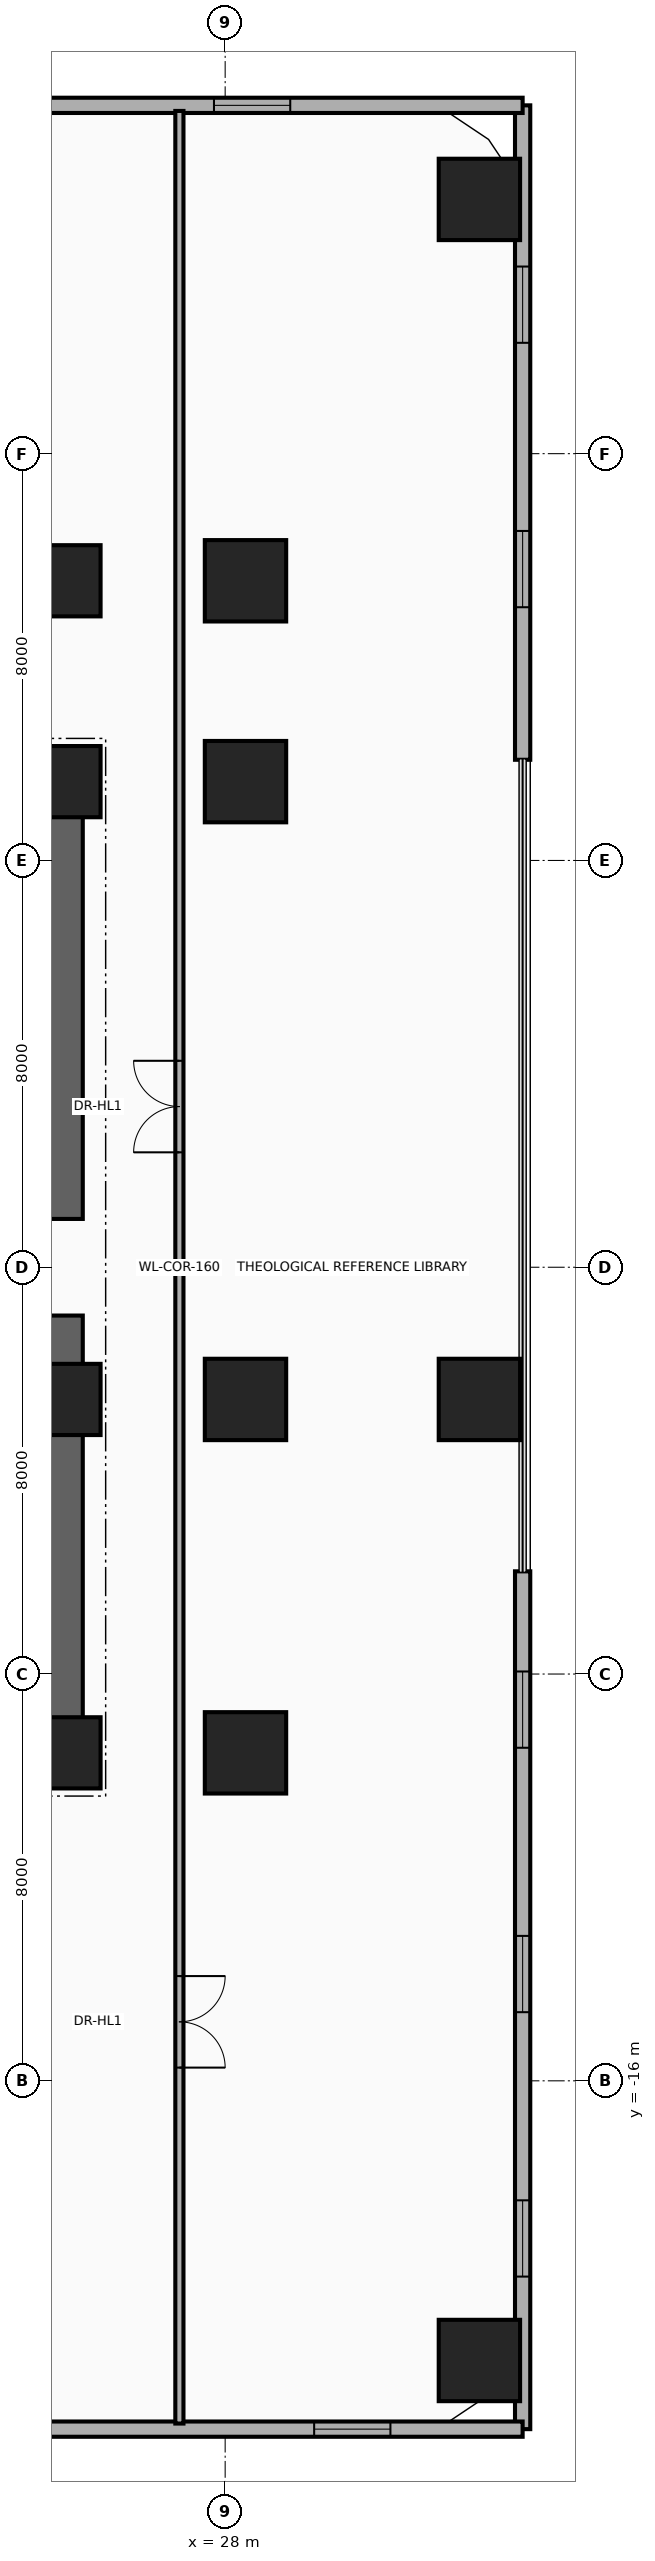
"""IFC4 building model, lengths in metres.
Left out: names, types, materials, properties, quantities, classifications, styles, units other than length and angle.
Written with IfcOpenShell. Run it as: python <this file> out.ifc"""

import sys

from ifc_helpers import new_model, si_unit, direction, frame, frame_2d, origin, origin_2d, place, context, subcontext, project, spatial, rectangle, extrude, source, transform, mapped, element, fill, save


model = new_model("IFC4")
c1 = context("Model", 3, precision=1e-05, world=origin(), true_north=direction((0.0, 1.0)))
c2 = subcontext(c1, "Body", "Model", "MODEL_VIEW")
j1 = project(units=[si_unit("LENGTHUNIT", "METRE"), si_unit("PLANEANGLEUNIT", "RADIAN")], contexts=[c1])
p1 = place(None, origin())
s1 = spatial("IfcSite", under=j1, at=p1, CompositionType="ELEMENT")
p2 = place(p1, origin())
s2 = spatial("IfcBuilding", under=s1, at=p2, CompositionType="ELEMENT")
p3 = place(p2, frame((0.0, 0.0, 15.6)))
s3 = spatial("IfcBuildingStorey", under=s2, at=p3, CompositionType="ELEMENT", Elevation=15.6)
for number, where, z_axis, x_axis in (
    (1, (24.85, -9.9, 0.0), (0.0, 0.0, 1.0), (0.0, 1.0, 0.0)),
    (2, (24.85, 0.95, 0.0), (0.0, 0.0, 1.0), (0.0, 1.0, 0.0)),
):
    element("IfcWall", number, at=place(p3, frame(where, z_axis=z_axis, x_axis=x_axis)), inside=s3, PredefinedType="SHEAR", context=c2, shape_type="SweptSolid", body=[
        extrude(rectangle(XDim=8.95, YDim=0.7, at=frame_2d((4.475, 0.0))), origin(), (0.0, 0.0, 1.0), 4.8),
    ])
for number, where, z_axis, x_axis in (
    (3, (15.85, 9.55, 0.0), (0.0, 0.0, 1.0), (1.0, 0.0, 0.0)),
    (4, (15.85, -9.55, 0.0), (0.0, 0.0, 1.0), (1.0, 0.0, 0.0)),
):
    element("IfcWall", number, at=place(p3, frame(where, z_axis=z_axis, x_axis=x_axis)), inside=s3, PredefinedType="SHEAR", context=c2, shape_type="SweptSolid", body=[
        extrude(rectangle(XDim=9.0, YDim=0.7, at=frame_2d((4.5, 0.0))), origin(), (0.0, 0.0, 1.0), 4.8),
    ])
m1 = source(origin(), c2, "Body", "SweptSolid", [
    extrude(rectangle(XDim=1.4, YDim=1.4, at=origin_2d()), origin(), (0.0, 0.0, 1.0), 5.2),
])
p4 = place(p3, frame((24.85, -9.55, 0.0), z_axis=(0.0, 0.0, 1.0), x_axis=(1.0, 0.0, 0.0)))
e5 = element("IfcColumn", 5, at=p4, inside=s3, PredefinedType="COLUMN", context=c2, shape_type="MappedRepresentation", body=[
    mapped(m1, transform((0.0, 0.0, 0.0), x_axis=(1.0, 0.0, 0.0), y_axis=(0.0, 1.0, 0.0), z_axis=(0.0, 0.0, 1.0), scale=1.0)),
])
m2 = source(origin(), c2, "Body", "SweptSolid", [
    extrude(rectangle(XDim=1.6, YDim=1.6, at=origin_2d()), origin(), (0.0, 0.0, 1.0), 5.2),
])
p5 = place(p3, frame((28.4, -9.55, 0.0), z_axis=(0.0, 0.0, 1.0), x_axis=(1.0, 0.0, 0.0)))
e6 = element("IfcColumn", 6, at=p5, inside=s3, PredefinedType="COLUMN", context=c2, shape_type="MappedRepresentation", body=[
    mapped(m2, transform((0.0, 0.0, 0.0), x_axis=(1.0, 0.0, 0.0), y_axis=(0.0, 1.0, 0.0), z_axis=(0.0, 0.0, 1.0), scale=1.0)),
])
p6 = place(p3, frame((24.85, -2.6, 0.0), z_axis=(0.0, 0.0, 1.0), x_axis=(1.0, 0.0, 0.0)))
e7 = element("IfcColumn", 7, at=p6, inside=s3, PredefinedType="COLUMN", context=c2, shape_type="MappedRepresentation", body=[
    mapped(m1, transform((0.0, 0.0, 0.0), x_axis=(1.0, 0.0, 0.0), y_axis=(0.0, 1.0, 0.0), z_axis=(0.0, 0.0, 1.0), scale=1.0)),
])
p7 = place(p3, frame((28.4, -2.6, 0.0), z_axis=(0.0, 0.0, 1.0), x_axis=(1.0, 0.0, 0.0)))
e8 = element("IfcColumn", 8, at=p7, inside=s3, PredefinedType="COLUMN", context=c2, shape_type="MappedRepresentation", body=[
    mapped(m2, transform((0.0, 0.0, 0.0), x_axis=(1.0, 0.0, 0.0), y_axis=(0.0, 1.0, 0.0), z_axis=(0.0, 0.0, 1.0), scale=1.0)),
])
p8 = place(p3, frame((24.85, 9.55, 0.0), z_axis=(0.0, 0.0, 1.0), x_axis=(1.0, 0.0, 0.0)))
e9 = element("IfcColumn", 9, at=p8, inside=s3, PredefinedType="COLUMN", context=c2, shape_type="MappedRepresentation", body=[
    mapped(m1, transform((0.0, 0.0, 0.0), x_axis=(1.0, 0.0, 0.0), y_axis=(0.0, 1.0, 0.0), z_axis=(0.0, 0.0, 1.0), scale=1.0)),
])
p9 = place(p3, frame((28.4, 9.55, 0.0), z_axis=(0.0, 0.0, 1.0), x_axis=(1.0, 0.0, 0.0)))
e10 = element("IfcColumn", 10, at=p9, inside=s3, PredefinedType="COLUMN", context=c2, shape_type="MappedRepresentation", body=[
    mapped(m2, transform((0.0, 0.0, 0.0), x_axis=(1.0, 0.0, 0.0), y_axis=(0.0, 1.0, 0.0), z_axis=(0.0, 0.0, 1.0), scale=1.0)),
])
p10 = place(p3, frame((24.85, 13.5, 0.0), z_axis=(0.0, 0.0, 1.0), x_axis=(1.0, 0.0, 0.0)))
e11 = element("IfcColumn", 11, at=p10, inside=s3, PredefinedType="COLUMN", context=c2, shape_type="MappedRepresentation", body=[
    mapped(m1, transform((0.0, 0.0, 0.0), x_axis=(1.0, 0.0, 0.0), y_axis=(0.0, 1.0, 0.0), z_axis=(0.0, 0.0, 1.0), scale=1.0)),
])
for number, where, z_axis, x_axis in (
    (12, (28.4, 13.5, 0.0), (0.0, 0.0, 1.0), (1.0, 0.0, 0.0)),
    (13, (33.0, 21.0, 0.0), (0.0, 0.0, 1.0), (1.0, 0.0, 0.0)),
    (14, (33.0, -2.6, 0.0), (0.0, 0.0, 1.0), (1.0, 0.0, 0.0)),
    (15, (33.0, -21.5, 0.0), (0.0, 0.0, 1.0), (1.0, 0.0, 0.0)),
):
    element("IfcColumn", number, at=place(p3, frame(where, z_axis=z_axis, x_axis=x_axis)), inside=s3, PredefinedType="COLUMN", context=c2, shape_type="MappedRepresentation", body=[
        mapped(m2, transform((0.0, 0.0, 0.0), x_axis=(1.0, 0.0, 0.0), y_axis=(0.0, 1.0, 0.0), z_axis=(0.0, 0.0, 1.0), scale=1.0)),
    ])
p11 = place(p3, frame((33.85, -22.85, 0.0), z_axis=(0.0, 0.0, 1.0), x_axis=(0.0, 1.0, 0.0)))
e16 = element("IfcWall", 16, at=p11, inside=s3, PredefinedType="SOLIDWALL", context=c2, shape_type="SweptSolid", body=[
    extrude(rectangle(XDim=16.87, YDim=0.3, at=frame_2d((8.435, 0.0))), origin(), (0.0, 0.0, 1.0), 4.8),
])
p12 = place(p11, frame((3.0, 0.0, 0.9)))
e17 = element("IfcOpeningElement", 17, at=p12, cuts=e16, PredefinedType="OPENING", context=c2, shape_type="SweptSolid", body=[
    extrude(rectangle(XDim=1.5, YDim=1.75, at=frame_2d((0.75, 0.875))), frame((0.0, 0.165, 0.0), z_axis=(0.0, -1.0, 0.0), x_axis=(1.0, 0.0, 0.0)), (0.0, 0.0, 1.0), 0.33),
])
p13 = place(p11, frame((8.2, 0.0, 0.9)))
e18 = element("IfcOpeningElement", 18, at=p13, cuts=e16, PredefinedType="OPENING", context=c2, shape_type="SweptSolid", body=[
    extrude(rectangle(XDim=1.5, YDim=1.75, at=frame_2d((0.75, 0.875))), frame((0.0, 0.165, 0.0), z_axis=(0.0, -1.0, 0.0), x_axis=(1.0, 0.0, 0.0)), (0.0, 0.0, 1.0), 0.33),
])
p14 = place(p11, frame((13.4, 0.0, 0.9)))
e19 = element("IfcOpeningElement", 19, at=p14, cuts=e16, PredefinedType="OPENING", context=c2, shape_type="SweptSolid", body=[
    extrude(rectangle(XDim=1.5, YDim=1.75, at=frame_2d((0.75, 0.875))), frame((0.0, 0.165, 0.0), z_axis=(0.0, -1.0, 0.0), x_axis=(1.0, 0.0, 0.0)), (0.0, 0.0, 1.0), 0.33),
])
p15 = place(p3, frame((33.85, 9.98, 0.0), z_axis=(0.0, 0.0, 1.0), x_axis=(0.0, 1.0, 0.0)))
e20 = element("IfcWall", 20, at=p15, inside=s3, PredefinedType="SOLIDWALL", context=c2, shape_type="SweptSolid", body=[
    extrude(rectangle(XDim=12.87, YDim=0.3, at=frame_2d((6.435, 0.0))), origin(), (0.0, 0.0, 1.0), 4.8),
])
p16 = place(p15, frame((3.0, 0.0, 0.9)))
e21 = element("IfcOpeningElement", 21, at=p16, cuts=e20, PredefinedType="OPENING", context=c2, shape_type="SweptSolid", body=[
    extrude(rectangle(XDim=1.5, YDim=1.75, at=frame_2d((0.75, 0.875))), frame((0.0, 0.165, 0.0), z_axis=(0.0, -1.0, 0.0), x_axis=(1.0, 0.0, 0.0)), (0.0, 0.0, 1.0), 0.33),
])
p17 = place(p15, frame((8.2, 0.0, 0.9)))
e22 = element("IfcOpeningElement", 22, at=p17, cuts=e20, PredefinedType="OPENING", context=c2, shape_type="SweptSolid", body=[
    extrude(rectangle(XDim=1.5, YDim=1.75, at=frame_2d((0.75, 0.875))), frame((0.0, 0.165, 0.0), z_axis=(0.0, -1.0, 0.0), x_axis=(1.0, 0.0, 0.0)), (0.0, 0.0, 1.0), 0.33),
])
p18 = place(p3, frame((12.15, -22.85, 0.0), z_axis=(0.0, 0.0, 1.0), x_axis=(1.0, 0.0, 0.0)))
e23 = element("IfcWall", 23, at=p18, inside=s3, PredefinedType="SOLIDWALL", context=c2, shape_type="SweptSolid", body=[
    extrude(rectangle(XDim=21.7, YDim=0.3, at=frame_2d((10.85, 0.0))), origin(), (0.0, 0.0, 1.0), 4.8),
])
p19 = place(p18, frame((3.2, 0.0, 0.9)))
e24 = element("IfcOpeningElement", 24, at=p19, cuts=e23, PredefinedType="OPENING", context=c2, shape_type="SweptSolid", body=[
    extrude(rectangle(XDim=1.5, YDim=1.75, at=frame_2d((0.75, 0.875))), frame((0.0, 0.165, 0.0), z_axis=(0.0, -1.0, 0.0), x_axis=(1.0, 0.0, 0.0)), (0.0, 0.0, 1.0), 0.33),
])
p20 = place(p18, frame((9.8, 0.0, 0.9)))
e25 = element("IfcOpeningElement", 25, at=p20, cuts=e23, PredefinedType="OPENING", context=c2, shape_type="SweptSolid", body=[
    extrude(rectangle(XDim=1.5, YDim=1.75, at=frame_2d((0.75, 0.875))), frame((0.0, 0.165, 0.0), z_axis=(0.0, -1.0, 0.0), x_axis=(1.0, 0.0, 0.0)), (0.0, 0.0, 1.0), 0.33),
])
p21 = place(p18, frame((17.6, 0.0, 0.9)))
e26 = element("IfcOpeningElement", 26, at=p21, cuts=e23, PredefinedType="OPENING", context=c2, shape_type="SweptSolid", body=[
    extrude(rectangle(XDim=1.5, YDim=1.75, at=frame_2d((0.75, 0.875))), frame((0.0, 0.165, 0.0), z_axis=(0.0, -1.0, 0.0), x_axis=(1.0, 0.0, 0.0)), (0.0, 0.0, 1.0), 0.33),
])
p22 = place(p3, frame((9.98, 22.85, 0.0), z_axis=(0.0, 0.0, 1.0), x_axis=(1.0, 0.0, 0.0)))
e27 = element("IfcWall", 27, at=p22, inside=s3, PredefinedType="SOLIDWALL", context=c2, shape_type="SweptSolid", body=[
    extrude(rectangle(XDim=23.87, YDim=0.3, at=frame_2d((11.935, 0.0))), origin(), (0.0, 0.0, 1.0), 4.8),
])
p23 = place(p22, frame((3.2, 0.0, 0.9)))
e28 = element("IfcOpeningElement", 28, at=p23, cuts=e27, PredefinedType="OPENING", context=c2, shape_type="SweptSolid", body=[
    extrude(rectangle(XDim=1.5, YDim=1.75, at=frame_2d((0.75, 0.875))), frame((0.0, 0.165, 0.0), z_axis=(0.0, -1.0, 0.0), x_axis=(1.0, 0.0, 0.0)), (0.0, 0.0, 1.0), 0.33),
])
p24 = place(p22, frame((10.0, 0.0, 0.9)))
e29 = element("IfcOpeningElement", 29, at=p24, cuts=e27, PredefinedType="OPENING", context=c2, shape_type="SweptSolid", body=[
    extrude(rectangle(XDim=1.5, YDim=1.75, at=frame_2d((0.75, 0.875))), frame((0.0, 0.165, 0.0), z_axis=(0.0, -1.0, 0.0), x_axis=(1.0, 0.0, 0.0)), (0.0, 0.0, 1.0), 0.33),
])
p25 = place(p22, frame((17.8, 0.0, 0.9)))
e30 = element("IfcOpeningElement", 30, at=p25, cuts=e27, PredefinedType="OPENING", context=c2, shape_type="SweptSolid", body=[
    extrude(rectangle(XDim=1.5, YDim=1.75, at=frame_2d((0.75, 0.875))), frame((0.0, 0.165, 0.0), z_axis=(0.0, -1.0, 0.0), x_axis=(1.0, 0.0, 0.0)), (0.0, 0.0, 1.0), 0.33),
])
p26 = place(p3, frame((27.1, -22.74, 0.0), z_axis=(0.0, 0.0, 1.0), x_axis=(0.0, 1.0, 0.0)))
e31 = element("IfcWall", 31, at=p26, inside=s3, PredefinedType="PARTITIONING", context=c2, shape_type="SweptSolid", body=[
    extrude(rectangle(XDim=45.48, YDim=0.16, at=frame_2d((22.74, 0.0))), origin(), (0.0, 0.0, 1.0), 3.585),
])
p27 = place(p26, frame((7.0, 0.0, 0.0)))
e32 = element("IfcOpeningElement", 32, at=p27, cuts=e31, PredefinedType="OPENING", context=c2, shape_type="SweptSolid", body=[
    extrude(rectangle(XDim=1.8, YDim=2.15, at=frame_2d((0.9, 1.075))), frame((0.0, 0.095, 0.0), z_axis=(0.0, -1.0, 0.0), x_axis=(1.0, 0.0, 0.0)), (0.0, 0.0, 1.0), 0.19),
])
p28 = place(p26, frame((25.0, 0.0, 0.0)))
e33 = element("IfcOpeningElement", 33, at=p28, cuts=e31, PredefinedType="OPENING", context=c2, shape_type="SweptSolid", body=[
    extrude(rectangle(XDim=1.8, YDim=2.15, at=frame_2d((0.9, 1.075))), frame((0.0, 0.095, 0.0), z_axis=(0.0, -1.0, 0.0), x_axis=(1.0, 0.0, 0.0)), (0.0, 0.0, 1.0), 0.19),
])
p29 = place(p12, origin())
e34 = element("IfcWindow", 34, at=p29, inside=s3, PartitioningType="SINGLE_PANEL", PredefinedType="WINDOW", context=c2, shape_type="SweptSolid", body=[
    extrude(rectangle(XDim=1.5, YDim=1.75, at=frame_2d((0.75, 0.875))), frame((0.0, 0.03, 0.0), z_axis=(0.0, -1.0, 0.0), x_axis=(1.0, 0.0, 0.0)), (0.0, 0.0, 1.0), 0.06),
])
fill(e17, e34)
p30 = place(p13, origin())
e35 = element("IfcWindow", 35, at=p30, inside=s3, PartitioningType="SINGLE_PANEL", PredefinedType="WINDOW", context=c2, shape_type="SweptSolid", body=[
    extrude(rectangle(XDim=1.5, YDim=1.75, at=frame_2d((0.75, 0.875))), frame((0.0, 0.03, 0.0), z_axis=(0.0, -1.0, 0.0), x_axis=(1.0, 0.0, 0.0)), (0.0, 0.0, 1.0), 0.06),
])
fill(e18, e35)
p31 = place(p14, origin())
e36 = element("IfcWindow", 36, at=p31, inside=s3, PartitioningType="SINGLE_PANEL", PredefinedType="WINDOW", context=c2, shape_type="SweptSolid", body=[
    extrude(rectangle(XDim=1.5, YDim=1.75, at=frame_2d((0.75, 0.875))), frame((0.0, 0.03, 0.0), z_axis=(0.0, -1.0, 0.0), x_axis=(1.0, 0.0, 0.0)), (0.0, 0.0, 1.0), 0.06),
])
fill(e19, e36)
p32 = place(p16, origin())
e37 = element("IfcWindow", 37, at=p32, inside=s3, PartitioningType="SINGLE_PANEL", PredefinedType="WINDOW", context=c2, shape_type="SweptSolid", body=[
    extrude(rectangle(XDim=1.5, YDim=1.75, at=frame_2d((0.75, 0.875))), frame((0.0, 0.03, 0.0), z_axis=(0.0, -1.0, 0.0), x_axis=(1.0, 0.0, 0.0)), (0.0, 0.0, 1.0), 0.06),
])
fill(e21, e37)
p33 = place(p17, origin())
e38 = element("IfcWindow", 38, at=p33, inside=s3, PartitioningType="SINGLE_PANEL", PredefinedType="WINDOW", context=c2, shape_type="SweptSolid", body=[
    extrude(rectangle(XDim=1.5, YDim=1.75, at=frame_2d((0.75, 0.875))), frame((0.0, 0.03, 0.0), z_axis=(0.0, -1.0, 0.0), x_axis=(1.0, 0.0, 0.0)), (0.0, 0.0, 1.0), 0.06),
])
fill(e22, e38)
p34 = place(p21, origin())
e39 = element("IfcWindow", 39, at=p34, inside=s3, PartitioningType="SINGLE_PANEL", PredefinedType="WINDOW", context=c2, shape_type="SweptSolid", body=[
    extrude(rectangle(XDim=1.5, YDim=1.75, at=frame_2d((0.75, 0.875))), frame((0.0, 0.03, 0.0), z_axis=(0.0, -1.0, 0.0), x_axis=(1.0, 0.0, 0.0)), (0.0, 0.0, 1.0), 0.06),
])
fill(e26, e39)
p35 = place(p25, origin())
e40 = element("IfcWindow", 40, at=p35, inside=s3, PartitioningType="SINGLE_PANEL", PredefinedType="WINDOW", context=c2, shape_type="SweptSolid", body=[
    extrude(rectangle(XDim=1.5, YDim=1.75, at=frame_2d((0.75, 0.875))), frame((0.0, 0.03, 0.0), z_axis=(0.0, -1.0, 0.0), x_axis=(1.0, 0.0, 0.0)), (0.0, 0.0, 1.0), 0.06),
])
fill(e30, e40)
p36 = place(p27, frame((1.8, 0.0, 0.0), z_axis=(0.0, 0.0, 1.0), x_axis=(-1.0, 0.0, 0.0)))
e41 = element("IfcDoor", 41, at=p36, inside=s3, OperationType="DOUBLE_DOOR_SINGLE_SWING", PredefinedType="DOOR", context=c2, shape_type="SweptSolid", body=[
    extrude(rectangle(XDim=1.8, YDim=2.15, at=frame_2d((0.9, 1.075))), frame((0.0, 0.025, 0.0), z_axis=(0.0, -1.0, 0.0), x_axis=(1.0, 0.0, 0.0)), (0.0, 0.0, 1.0), 0.05),
])
fill(e32, e41)
p37 = place(p28, origin())
e42 = element("IfcDoor", 42, at=p37, inside=s3, OperationType="DOUBLE_DOOR_SINGLE_SWING", PredefinedType="DOOR", context=c2, shape_type="SweptSolid", body=[
    extrude(rectangle(XDim=1.8, YDim=2.15, at=frame_2d((0.9, 1.075))), frame((0.0, 0.025, 0.0), z_axis=(0.0, -1.0, 0.0), x_axis=(1.0, 0.0, 0.0)), (0.0, 0.0, 1.0), 0.05),
])
fill(e33, e42)
save(model, sys.argv[1])
